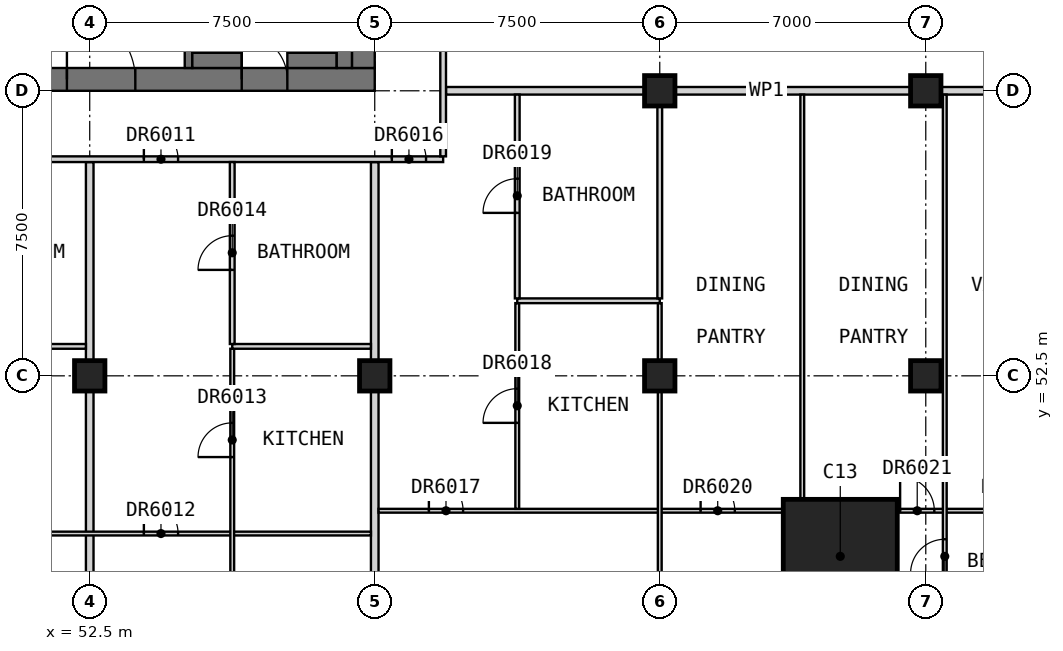
"""IFC4 building model, lengths in metres.
Left out: names, types, materials, properties, quantities, classifications, styles, units other than length and angle.
Written with IfcOpenShell. Run it as: python <this file> out.ifc"""

import sys

from ifc_helpers import new_model, si_unit, direction, frame, frame_2d, origin, origin_2d, place, context, subcontext, project, spatial, rectangle, extrude, element, fill, save


model = new_model("IFC4")
c1 = context("Model", 3, precision=1e-05, world=origin(), true_north=direction((0.0, 1.0)))
c2 = subcontext(c1, "Body", "Model", "MODEL_VIEW")
j1 = project(units=[si_unit("LENGTHUNIT", "METRE"), si_unit("PLANEANGLEUNIT", "RADIAN")], contexts=[c1])
p1 = place(None, origin())
s1 = spatial("IfcSite", under=j1, at=p1, CompositionType="ELEMENT")
p2 = place(p1, origin())
s2 = spatial("IfcBuilding", under=s1, at=p2, CompositionType="ELEMENT")
p3 = place(p2, frame((0.0, 0.0, 254.7)))
s3 = spatial("IfcBuildingStorey", under=s2, at=p3, CompositionType="ELEMENT", Elevation=254.7)
for number, where, z_axis, x_axis in (
    (1, (52.5, 52.5, 0.0), (0.0, 0.0, 1.0), (1.0, 0.0, 0.0)),
    (2, (60.0, 52.5, 0.0), (0.0, 0.0, 1.0), (1.0, 0.0, 0.0)),
    (3, (67.5, 52.5, 0.0), (0.0, 0.0, 1.0), (1.0, 0.0, 0.0)),
    (4, (67.5, 60.0, 0.0), (0.0, 0.0, 1.0), (1.0, 0.0, 0.0)),
    (5, (74.5, 52.5, 0.0), (0.0, 0.0, 1.0), (1.0, 0.0, 0.0)),
    (6, (74.5, 60.0, 0.0), (0.0, 0.0, 1.0), (1.0, 0.0, 0.0)),
):
    element("IfcColumn", number, at=place(p3, frame(where, z_axis=z_axis, x_axis=x_axis)), inside=s3, PredefinedType="COLUMN", context=c2, shape_type="SweptSolid", body=[
        extrude(rectangle(XDim=0.8, YDim=0.8, at=origin_2d()), origin(), (0.0, 0.0, 1.0), 3.5),
    ])
p4 = place(p3, frame((72.25, 47.75, 0.0), z_axis=(0.0, 0.0, 1.0), x_axis=(1.0, 0.0, 0.0)))
e7 = element("IfcColumn", 7, at=p4, inside=s3, PredefinedType="COLUMN", context=c2, shape_type="SweptSolid", body=[
    extrude(rectangle(XDim=3.0, YDim=3.0, at=origin_2d()), origin(), (0.0, 0.0, 1.0), 3.5),
])
p5 = place(p3, frame((30.0, 60.3, 0.0), z_axis=(0.0, 0.0, 1.0), x_axis=(1.0, 0.0, 0.0)))
e8 = element("IfcWall", 8, at=p5, inside=s3, PredefinedType="SHEAR", context=c2, shape_type="SweptSolid", body=[
    extrude(rectangle(XDim=30.0, YDim=0.6, at=frame_2d((15.0, 0.0))), origin(), (0.0, 0.0, 1.0), 3.5),
])
p6 = place(p5, frame((21.9, 0.0, 0.0)))
e9 = element("IfcOpeningElement", 9, at=p6, cuts=e8, PredefinedType="OPENING", context=c2, shape_type="SweptSolid", body=[
    extrude(rectangle(XDim=1.8, YDim=2.1, at=frame_2d((0.9, 1.05))), frame((0.0, 0.31, 0.0), z_axis=(0.0, -1.0, 0.0), x_axis=(1.0, 0.0, 0.0)), (0.0, 0.0, 1.0), 0.62),
])
p7 = place(p5, frame((26.5, 0.0, 0.0)))
e10 = element("IfcOpeningElement", 10, at=p7, cuts=e8, PredefinedType="OPENING", context=c2, shape_type="SweptSolid", body=[
    extrude(rectangle(XDim=1.2, YDim=2.1, at=frame_2d((0.6, 1.05))), frame((0.0, 0.31, 0.0), z_axis=(0.0, -1.0, 0.0), x_axis=(1.0, 0.0, 0.0)), (0.0, 0.0, 1.0), 0.62),
])
p8 = place(p3, frame((59.7, 60.6, 0.0), z_axis=(0.0, 0.0, 1.0), x_axis=(0.0, 1.0, 0.0)))
e11 = element("IfcWall", 11, at=p8, inside=s3, PredefinedType="SHEAR", context=c2, shape_type="SweptSolid", body=[
    extrude(rectangle(XDim=21.3, YDim=0.6, at=frame_2d((10.65, 0.0))), origin(), (0.0, 0.0, 1.0), 3.5),
])
p9 = place(p8, frame((14.9, 0.0, 0.0)))
e12 = element("IfcOpeningElement", 12, at=p9, cuts=e11, PredefinedType="OPENING", context=c2, shape_type="SweptSolid", body=[
    extrude(rectangle(XDim=1.8, YDim=2.1, at=frame_2d((0.9, 1.05))), frame((0.0, 0.31, 0.0), z_axis=(0.0, -1.0, 0.0), x_axis=(1.0, 0.0, 0.0)), (0.0, 0.0, 1.0), 0.62),
])
p10 = place(p3, frame((55.1, 60.6, 0.0), z_axis=(0.0, 0.0, 1.0), x_axis=(0.0, 1.0, 0.0)))
e13 = element("IfcWall", 13, at=p10, inside=s3, PredefinedType="SOLIDWALL", context=c2, shape_type="SweptSolid", body=[
    extrude(rectangle(XDim=8.0, YDim=0.2, at=frame_2d((4.0, 0.0))), origin(), (0.0, 0.0, 1.0), 3.09),
])
for number, where, z_axis, x_axis in (
    (14, (55.2, 60.8, 0.0), (0.0, 0.0, 1.0), (1.0, 0.0, 0.0)),
    (15, (57.7, 60.8, 0.0), (0.0, 0.0, 1.0), (1.0, 0.0, 0.0)),
):
    element("IfcWall", number, at=place(p3, frame(where, z_axis=z_axis, x_axis=x_axis)), inside=s3, PredefinedType="SOLIDWALL", context=c2, shape_type="SweptSolid", body=[
        extrude(rectangle(XDim=1.3, YDim=0.4, at=frame_2d((0.65, 0.0))), origin(), (0.0, 0.0, 1.0), 3.09),
    ])
p11 = place(p3, frame((59.2, 60.6, 0.0), z_axis=(0.0, 0.0, 1.0), x_axis=(0.0, 1.0, 0.0)))
e16 = element("IfcWall", 16, at=p11, inside=s3, PredefinedType="SOLIDWALL", context=c2, shape_type="SweptSolid", body=[
    extrude(rectangle(XDim=7.9, YDim=0.4, at=frame_2d((3.95, 0.0))), origin(), (0.0, 0.0, 1.0), 3.09),
])
for number, where, z_axis, x_axis in (
    (17, (61.875, 60.0, 0.0), (0.0, 0.0, 1.0), (1.0, 0.0, 0.0)),
    (18, (52.5, 41.25, 0.0), (0.0, 0.0, 1.0), (0.0, 1.0, 0.0)),
    (19, (60.0, 41.25, 0.0), (0.0, 0.0, 1.0), (0.0, 1.0, 0.0)),
):
    element("IfcWall", number, at=place(p3, frame(where, z_axis=z_axis, x_axis=x_axis)), inside=s3, PredefinedType="PARTITIONING", context=c2, shape_type="SweptSolid", body=[
        extrude(rectangle(XDim=16.875, YDim=0.2, at=frame_2d((8.438, 0.0))), origin(), (0.0, 0.0, 1.0), 3.1),
    ])
p12 = place(p3, frame((33.75, 58.2, 0.0), z_axis=(0.0, 0.0, 1.0), x_axis=(1.0, 0.0, 0.0)))
e20 = element("IfcWall", 20, at=p12, inside=s3, PredefinedType="PARTITIONING", context=c2, shape_type="SweptSolid", body=[
    extrude(rectangle(XDim=28.05, YDim=0.15, at=frame_2d((14.025, 0.0))), origin(), (0.0, 0.0, 1.0), 3.1),
])
p13 = place(p12, frame((1.375, 0.0, 0.0)))
e21 = element("IfcOpeningElement", 21, at=p13, cuts=e20, PredefinedType="OPENING", context=c2, shape_type="SweptSolid", body=[
    extrude(rectangle(XDim=1.0, YDim=2.1, at=frame_2d((0.5, 1.05))), frame((0.0, 0.085, 0.0), z_axis=(0.0, -1.0, 0.0), x_axis=(1.0, 0.0, 0.0)), (0.0, 0.0, 1.0), 0.17),
])
p14 = place(p12, frame((5.175, 0.0, 0.0)))
e22 = element("IfcOpeningElement", 22, at=p14, cuts=e20, PredefinedType="OPENING", context=c2, shape_type="SweptSolid", body=[
    extrude(rectangle(XDim=0.9, YDim=2.1, at=frame_2d((0.45, 1.05))), frame((0.0, 0.085, 0.0), z_axis=(0.0, -1.0, 0.0), x_axis=(1.0, 0.0, 0.0)), (0.0, 0.0, 1.0), 0.17),
])
p15 = place(p12, frame((12.675, 0.0, 0.0)))
e23 = element("IfcOpeningElement", 23, at=p15, cuts=e20, PredefinedType="OPENING", context=c2, shape_type="SweptSolid", body=[
    extrude(rectangle(XDim=0.9, YDim=2.1, at=frame_2d((0.45, 1.05))), frame((0.0, 0.085, 0.0), z_axis=(0.0, -1.0, 0.0), x_axis=(1.0, 0.0, 0.0)), (0.0, 0.0, 1.0), 0.17),
])
p16 = place(p12, frame((20.175, 0.0, 0.0)))
e24 = element("IfcOpeningElement", 24, at=p16, cuts=e20, PredefinedType="OPENING", context=c2, shape_type="SweptSolid", body=[
    extrude(rectangle(XDim=0.9, YDim=2.1, at=frame_2d((0.45, 1.05))), frame((0.0, 0.085, 0.0), z_axis=(0.0, -1.0, 0.0), x_axis=(1.0, 0.0, 0.0)), (0.0, 0.0, 1.0), 0.17),
])
p17 = place(p12, frame((26.7, 0.0, 0.0)))
e25 = element("IfcOpeningElement", 25, at=p17, cuts=e20, PredefinedType="OPENING", context=c2, shape_type="SweptSolid", body=[
    extrude(rectangle(XDim=0.9, YDim=2.1, at=frame_2d((0.45, 1.05))), frame((0.0, 0.085, 0.0), z_axis=(0.0, -1.0, 0.0), x_axis=(1.0, 0.0, 0.0)), (0.0, 0.0, 1.0), 0.17),
])
p18 = place(p3, frame((61.8, 58.275, 0.0), z_axis=(0.0, 0.0, 1.0), x_axis=(0.0, 1.0, 0.0)))
e26 = element("IfcWall", 26, at=p18, inside=s3, PredefinedType="PARTITIONING", context=c2, shape_type="SweptSolid", body=[
    extrude(rectangle(XDim=25.95, YDim=0.15, at=frame_2d((12.975, 0.0))), origin(), (0.0, 0.0, 1.0), 3.1),
])
p19 = place(p18, frame((4.575, 0.0, 0.0)))
e27 = element("IfcOpeningElement", 27, at=p19, cuts=e26, PredefinedType="OPENING", context=c2, shape_type="SweptSolid", body=[
    extrude(rectangle(XDim=1.8, YDim=2.1, at=frame_2d((0.9, 1.05))), frame((0.0, 0.085, 0.0), z_axis=(0.0, -1.0, 0.0), x_axis=(1.0, 0.0, 0.0)), (0.0, 0.0, 1.0), 0.17),
])
p20 = place(p18, frame((10.65, 0.0, 0.0)))
e28 = element("IfcOpeningElement", 28, at=p20, cuts=e26, PredefinedType="OPENING", context=c2, shape_type="SweptSolid", body=[
    extrude(rectangle(XDim=0.9, YDim=2.1, at=frame_2d((0.45, 1.05))), frame((0.0, 0.085, 0.0), z_axis=(0.0, -1.0, 0.0), x_axis=(1.0, 0.0, 0.0)), (0.0, 0.0, 1.0), 0.17),
])
p21 = place(p18, frame((18.15, 0.0, 0.0)))
e29 = element("IfcOpeningElement", 29, at=p21, cuts=e26, PredefinedType="OPENING", context=c2, shape_type="SweptSolid", body=[
    extrude(rectangle(XDim=0.9, YDim=2.1, at=frame_2d((0.45, 1.05))), frame((0.0, 0.085, 0.0), z_axis=(0.0, -1.0, 0.0), x_axis=(1.0, 0.0, 0.0)), (0.0, 0.0, 1.0), 0.17),
])
p22 = place(p3, frame((37.6, 48.35, 0.0), z_axis=(0.0, 0.0, 1.0), x_axis=(1.0, 0.0, 0.0)))
e30 = element("IfcWall", 30, at=p22, inside=s3, PredefinedType="PARTITIONING", context=c2, shape_type="SweptSolid", body=[
    extrude(rectangle(XDim=22.3, YDim=0.1, at=frame_2d((11.15, 0.0))), origin(), (0.0, 0.0, 1.0), 3.1),
])
p23 = place(p22, frame((1.325, 0.0, 0.0)))
e31 = element("IfcOpeningElement", 31, at=p23, cuts=e30, PredefinedType="OPENING", context=c2, shape_type="SweptSolid", body=[
    extrude(rectangle(XDim=0.9, YDim=2.1, at=frame_2d((0.45, 1.05))), frame((0.0, 0.06, 0.0), z_axis=(0.0, -1.0, 0.0), x_axis=(1.0, 0.0, 0.0)), (0.0, 0.0, 1.0), 0.12),
])
p24 = place(p22, frame((8.825, 0.0, 0.0)))
e32 = element("IfcOpeningElement", 32, at=p24, cuts=e30, PredefinedType="OPENING", context=c2, shape_type="SweptSolid", body=[
    extrude(rectangle(XDim=0.9, YDim=2.1, at=frame_2d((0.45, 1.05))), frame((0.0, 0.06, 0.0), z_axis=(0.0, -1.0, 0.0), x_axis=(1.0, 0.0, 0.0)), (0.0, 0.0, 1.0), 0.12),
])
p25 = place(p22, frame((16.325, 0.0, 0.0)))
e33 = element("IfcOpeningElement", 33, at=p25, cuts=e30, PredefinedType="OPENING", context=c2, shape_type="SweptSolid", body=[
    extrude(rectangle(XDim=0.9, YDim=2.1, at=frame_2d((0.45, 1.05))), frame((0.0, 0.06, 0.0), z_axis=(0.0, -1.0, 0.0), x_axis=(1.0, 0.0, 0.0)), (0.0, 0.0, 1.0), 0.12),
])
p26 = place(p3, frame((60.1, 48.95, 0.0), z_axis=(0.0, 0.0, 1.0), x_axis=(1.0, 0.0, 0.0)))
e34 = element("IfcWall", 34, at=p26, inside=s3, PredefinedType="PARTITIONING", context=c2, shape_type="SweptSolid", body=[
    extrude(rectangle(XDim=17.84, YDim=0.1, at=frame_2d((8.92, 0.0))), origin(), (0.0, 0.0, 1.0), 3.1),
])
p27 = place(p26, frame((1.325, 0.0, 0.0)))
e35 = element("IfcOpeningElement", 35, at=p27, cuts=e34, PredefinedType="OPENING", context=c2, shape_type="SweptSolid", body=[
    extrude(rectangle(XDim=0.9, YDim=2.1, at=frame_2d((0.45, 1.05))), frame((0.0, 0.06, 0.0), z_axis=(0.0, -1.0, 0.0), x_axis=(1.0, 0.0, 0.0)), (0.0, 0.0, 1.0), 0.12),
])
p28 = place(p26, frame((8.475, 0.0, 0.0)))
e36 = element("IfcOpeningElement", 36, at=p28, cuts=e34, PredefinedType="OPENING", context=c2, shape_type="SweptSolid", body=[
    extrude(rectangle(XDim=0.9, YDim=2.1, at=frame_2d((0.45, 1.05))), frame((0.0, 0.06, 0.0), z_axis=(0.0, -1.0, 0.0), x_axis=(1.0, 0.0, 0.0)), (0.0, 0.0, 1.0), 0.12),
])
p29 = place(p26, frame((13.725, 0.0, 0.0)))
e37 = element("IfcOpeningElement", 37, at=p29, cuts=e34, PredefinedType="OPENING", context=c2, shape_type="SweptSolid", body=[
    extrude(rectangle(XDim=0.9, YDim=2.1, at=frame_2d((0.45, 1.05))), frame((0.0, 0.06, 0.0), z_axis=(0.0, -1.0, 0.0), x_axis=(1.0, 0.0, 0.0)), (0.0, 0.0, 1.0), 0.12),
])
p30 = place(p26, frame((16.325, 0.0, 0.0)))
e38 = element("IfcOpeningElement", 38, at=p30, cuts=e34, PredefinedType="OPENING", context=c2, shape_type="SweptSolid", body=[
    extrude(rectangle(XDim=0.9, YDim=2.1, at=frame_2d((0.45, 1.05))), frame((0.0, 0.06, 0.0), z_axis=(0.0, -1.0, 0.0), x_axis=(1.0, 0.0, 0.0)), (0.0, 0.0, 1.0), 0.12),
])
p31 = place(p3, frame((56.25, 42.06, 0.0), z_axis=(0.0, 0.0, 1.0), x_axis=(0.0, 1.0, 0.0)))
e39 = element("IfcWall", 39, at=p31, inside=s3, PredefinedType="PARTITIONING", context=c2, shape_type="SweptSolid", body=[
    extrude(rectangle(XDim=11.152, YDim=0.1, at=frame_2d((5.576, 0.0))), origin(), (0.0, 0.0, 1.0), 3.1),
])
p32 = place(p31, frame((8.302, 0.0, 0.0)))
e40 = element("IfcOpeningElement", 40, at=p32, cuts=e39, PredefinedType="OPENING", context=c2, shape_type="SweptSolid", body=[
    extrude(rectangle(XDim=0.9, YDim=2.1, at=frame_2d((0.45, 1.05))), frame((0.0, 0.06, 0.0), z_axis=(0.0, -1.0, 0.0), x_axis=(1.0, 0.0, 0.0)), (0.0, 0.0, 1.0), 0.12),
])
p33 = place(p31, frame((2.29, 0.0, 0.0)))
e41 = element("IfcOpeningElement", 41, at=p33, cuts=e39, PredefinedType="OPENING", context=c2, shape_type="SweptSolid", body=[
    extrude(rectangle(XDim=0.9, YDim=2.1, at=frame_2d((0.45, 1.05))), frame((0.0, 0.06, 0.0), z_axis=(0.0, -1.0, 0.0), x_axis=(1.0, 0.0, 0.0)), (0.0, 0.0, 1.0), 0.12),
])
p34 = place(p3, frame((63.75, 49.0, 0.0), z_axis=(0.0, 0.0, 1.0), x_axis=(0.0, 1.0, 0.0)))
e42 = element("IfcWall", 42, at=p34, inside=s3, PredefinedType="PARTITIONING", context=c2, shape_type="SweptSolid", body=[
    extrude(rectangle(XDim=5.413, YDim=0.1, at=frame_2d((2.706, 0.0))), origin(), (0.0, 0.0, 1.0), 3.1),
])
p35 = place(p34, frame((2.262, 0.0, 0.0)))
e43 = element("IfcOpeningElement", 43, at=p35, cuts=e42, PredefinedType="OPENING", context=c2, shape_type="SweptSolid", body=[
    extrude(rectangle(XDim=0.9, YDim=2.1, at=frame_2d((0.45, 1.05))), frame((0.0, 0.06, 0.0), z_axis=(0.0, -1.0, 0.0), x_axis=(1.0, 0.0, 0.0)), (0.0, 0.0, 1.0), 0.12),
])
p36 = place(p3, frame((67.5, 41.25, 0.0), z_axis=(0.0, 0.0, 1.0), x_axis=(0.0, 1.0, 0.0)))
e44 = element("IfcWall", 44, at=p36, inside=s3, PredefinedType="PARTITIONING", context=c2, shape_type="SweptSolid", body=[
    extrude(rectangle(XDim=13.163, YDim=0.1, at=frame_2d((6.581, 0.0))), origin(), (0.0, 0.0, 1.0), 3.1),
])
p37 = place(p36, frame((2.9, 0.0, 0.0)))
e45 = element("IfcOpeningElement", 45, at=p37, cuts=e44, PredefinedType="OPENING", context=c2, shape_type="SweptSolid", body=[
    extrude(rectangle(XDim=0.9, YDim=2.1, at=frame_2d((0.45, 1.05))), frame((0.0, 0.06, 0.0), z_axis=(0.0, -1.0, 0.0), x_axis=(1.0, 0.0, 0.0)), (0.0, 0.0, 1.0), 0.12),
])
p38 = place(p3, frame((71.25, 49.0, 0.0), z_axis=(0.0, 0.0, 1.0), x_axis=(0.0, 1.0, 0.0)))
e46 = element("IfcWall", 46, at=p38, inside=s3, PredefinedType="PARTITIONING", context=c2, shape_type="SweptSolid", body=[
    extrude(rectangle(XDim=10.9, YDim=0.1, at=frame_2d((5.45, 0.0))), origin(), (0.0, 0.0, 1.0), 3.1),
])
p39 = place(p3, frame((75.0, 47.06, 0.0), z_axis=(0.0, 0.0, 1.0), x_axis=(0.0, 1.0, 0.0)))
e47 = element("IfcWall", 47, at=p39, inside=s3, PredefinedType="PARTITIONING", context=c2, shape_type="SweptSolid", body=[
    extrude(rectangle(XDim=12.84, YDim=0.1, at=frame_2d((6.42, 0.0))), origin(), (0.0, 0.0, 1.0), 3.1),
])
p40 = place(p39, frame((0.24, 0.0, 0.0)))
e48 = element("IfcOpeningElement", 48, at=p40, cuts=e47, PredefinedType="OPENING", context=c2, shape_type="SweptSolid", body=[
    extrude(rectangle(XDim=0.9, YDim=2.1, at=frame_2d((0.45, 1.05))), frame((0.0, 0.06, 0.0), z_axis=(0.0, -1.0, 0.0), x_axis=(1.0, 0.0, 0.0)), (0.0, 0.0, 1.0), 0.12),
])
for number, where, z_axis, x_axis in (
    (49, (48.75, 53.275, 0.0), (0.0, 0.0, 1.0), (1.0, 0.0, 0.0)),
    (50, (56.25, 53.275, 0.0), (0.0, 0.0, 1.0), (1.0, 0.0, 0.0)),
):
    element("IfcWall", number, at=place(p3, frame(where, z_axis=z_axis, x_axis=x_axis)), inside=s3, PredefinedType="PARTITIONING", context=c2, shape_type="SweptSolid", body=[
        extrude(rectangle(XDim=3.65, YDim=0.125, at=frame_2d((1.825, 0.0))), origin(), (0.0, 0.0, 1.0), 3.1),
    ])
p41 = place(p3, frame((63.75, 54.475, 0.0), z_axis=(0.0, 0.0, 1.0), x_axis=(1.0, 0.0, 0.0)))
e51 = element("IfcWall", 51, at=p41, inside=s3, PredefinedType="PARTITIONING", context=c2, shape_type="SweptSolid", body=[
    extrude(rectangle(XDim=3.75, YDim=0.125, at=frame_2d((1.875, 0.0))), origin(), (0.0, 0.0, 1.0), 3.1),
])
p42 = place(p3, frame((56.25, 53.337, 0.0), z_axis=(0.0, 0.0, 1.0), x_axis=(0.0, 1.0, 0.0)))
e52 = element("IfcWall", 52, at=p42, inside=s3, PredefinedType="PARTITIONING", context=c2, shape_type="SweptSolid", body=[
    extrude(rectangle(XDim=4.788, YDim=0.125, at=frame_2d((2.394, 0.0))), origin(), (0.0, 0.0, 1.0), 3.1),
])
p43 = place(p42, frame((1.95, 0.0, 0.0)))
e53 = element("IfcOpeningElement", 53, at=p43, cuts=e52, PredefinedType="OPENING", context=c2, shape_type="SweptSolid", body=[
    extrude(rectangle(XDim=0.9, YDim=2.1, at=frame_2d((0.45, 1.05))), frame((0.0, 0.073, 0.0), z_axis=(0.0, -1.0, 0.0), x_axis=(1.0, 0.0, 0.0)), (0.0, 0.0, 1.0), 0.145),
])
p44 = place(p3, frame((63.75, 54.538, 0.0), z_axis=(0.0, 0.0, 1.0), x_axis=(0.0, 1.0, 0.0)))
e54 = element("IfcWall", 54, at=p44, inside=s3, PredefinedType="PARTITIONING", context=c2, shape_type="SweptSolid", body=[
    extrude(rectangle(XDim=5.362, YDim=0.125, at=frame_2d((2.681, 0.0))), origin(), (0.0, 0.0, 1.0), 3.1),
])
p45 = place(p44, frame((2.25, 0.0, 0.0)))
e55 = element("IfcOpeningElement", 55, at=p45, cuts=e54, PredefinedType="OPENING", context=c2, shape_type="SweptSolid", body=[
    extrude(rectangle(XDim=0.9, YDim=2.1, at=frame_2d((0.45, 1.05))), frame((0.0, 0.073, 0.0), z_axis=(0.0, -1.0, 0.0), x_axis=(1.0, 0.0, 0.0)), (0.0, 0.0, 1.0), 0.145),
])
p46 = place(p3, frame((67.5, 54.538, 0.0), z_axis=(0.0, 0.0, 1.0), x_axis=(0.0, 1.0, 0.0)))
e56 = element("IfcWall", 56, at=p46, inside=s3, PredefinedType="PARTITIONING", context=c2, shape_type="SweptSolid", body=[
    extrude(rectangle(XDim=5.362, YDim=0.125, at=frame_2d((2.681, 0.0))), origin(), (0.0, 0.0, 1.0), 3.1),
])
p47 = place(p6, origin())
e57 = element("IfcDoor", 57, at=p47, inside=s3, OperationType="DOUBLE_DOOR_SINGLE_SWING", PredefinedType="DOOR", context=c2, shape_type="SweptSolid", body=[
    extrude(rectangle(XDim=1.8, YDim=2.1, at=frame_2d((0.9, 1.05))), frame((0.0, 0.025, 0.0), z_axis=(0.0, -1.0, 0.0), x_axis=(1.0, 0.0, 0.0)), (0.0, 0.0, 1.0), 0.05),
])
fill(e9, e57)
p48 = place(p7, origin())
e58 = element("IfcDoor", 58, at=p48, inside=s3, OperationType="SINGLE_SWING_LEFT", PredefinedType="DOOR", context=c2, shape_type="SweptSolid", body=[
    extrude(rectangle(XDim=1.2, YDim=2.1, at=frame_2d((0.6, 1.05))), frame((0.0, 0.025, 0.0), z_axis=(0.0, -1.0, 0.0), x_axis=(1.0, 0.0, 0.0)), (0.0, 0.0, 1.0), 0.05),
])
fill(e10, e58)
p49 = place(p16, origin())
e59 = element("IfcDoor", 59, at=p49, inside=s3, OperationType="SINGLE_SWING_RIGHT", PredefinedType="DOOR", context=c2, shape_type="SweptSolid", body=[
    extrude(rectangle(XDim=0.9, YDim=2.1, at=frame_2d((0.45, 1.05))), frame((0.0, 0.025, 0.0), z_axis=(0.0, -1.0, 0.0), x_axis=(1.0, 0.0, 0.0)), (0.0, 0.0, 1.0), 0.05),
])
fill(e24, e59)
p50 = place(p25, origin())
e60 = element("IfcDoor", 60, at=p50, inside=s3, OperationType="SINGLE_SWING_LEFT", PredefinedType="DOOR", context=c2, shape_type="SweptSolid", body=[
    extrude(rectangle(XDim=0.9, YDim=2.1, at=frame_2d((0.45, 1.05))), frame((0.0, 0.025, 0.0), z_axis=(0.0, -1.0, 0.0), x_axis=(1.0, 0.0, 0.0)), (0.0, 0.0, 1.0), 0.05),
])
fill(e33, e60)
p51 = place(p32, origin())
e61 = element("IfcDoor", 61, at=p51, inside=s3, OperationType="SINGLE_SWING_LEFT", PredefinedType="DOOR", context=c2, shape_type="SweptSolid", body=[
    extrude(rectangle(XDim=0.9, YDim=2.1, at=frame_2d((0.45, 1.05))), frame((0.0, 0.025, 0.0), z_axis=(0.0, -1.0, 0.0), x_axis=(1.0, 0.0, 0.0)), (0.0, 0.0, 1.0), 0.05),
])
fill(e40, e61)
p52 = place(p43, origin())
e62 = element("IfcDoor", 62, at=p52, inside=s3, OperationType="SINGLE_SWING_RIGHT", PredefinedType="DOOR", context=c2, shape_type="SweptSolid", body=[
    extrude(rectangle(XDim=0.9, YDim=2.1, at=frame_2d((0.45, 1.05))), frame((0.0, 0.025, 0.0), z_axis=(0.0, -1.0, 0.0), x_axis=(1.0, 0.0, 0.0)), (0.0, 0.0, 1.0), 0.05),
])
fill(e53, e62)
p53 = place(p17, origin())
e63 = element("IfcDoor", 63, at=p53, inside=s3, OperationType="SINGLE_SWING_RIGHT", PredefinedType="DOOR", context=c2, shape_type="SweptSolid", body=[
    extrude(rectangle(XDim=0.9, YDim=2.1, at=frame_2d((0.45, 1.05))), frame((0.0, 0.025, 0.0), z_axis=(0.0, -1.0, 0.0), x_axis=(1.0, 0.0, 0.0)), (0.0, 0.0, 1.0), 0.05),
])
fill(e25, e63)
p54 = place(p27, origin())
e64 = element("IfcDoor", 64, at=p54, inside=s3, OperationType="SINGLE_SWING_LEFT", PredefinedType="DOOR", context=c2, shape_type="SweptSolid", body=[
    extrude(rectangle(XDim=0.9, YDim=2.1, at=frame_2d((0.45, 1.05))), frame((0.0, 0.025, 0.0), z_axis=(0.0, -1.0, 0.0), x_axis=(1.0, 0.0, 0.0)), (0.0, 0.0, 1.0), 0.05),
])
fill(e35, e64)
p55 = place(p35, origin())
e65 = element("IfcDoor", 65, at=p55, inside=s3, OperationType="SINGLE_SWING_RIGHT", PredefinedType="DOOR", context=c2, shape_type="SweptSolid", body=[
    extrude(rectangle(XDim=0.9, YDim=2.1, at=frame_2d((0.45, 1.05))), frame((0.0, 0.025, 0.0), z_axis=(0.0, -1.0, 0.0), x_axis=(1.0, 0.0, 0.0)), (0.0, 0.0, 1.0), 0.05),
])
fill(e43, e65)
p56 = place(p45, origin())
e66 = element("IfcDoor", 66, at=p56, inside=s3, OperationType="SINGLE_SWING_RIGHT", PredefinedType="DOOR", context=c2, shape_type="SweptSolid", body=[
    extrude(rectangle(XDim=0.9, YDim=2.1, at=frame_2d((0.45, 1.05))), frame((0.0, 0.025, 0.0), z_axis=(0.0, -1.0, 0.0), x_axis=(1.0, 0.0, 0.0)), (0.0, 0.0, 1.0), 0.05),
])
fill(e55, e66)
p57 = place(p28, origin())
e67 = element("IfcDoor", 67, at=p57, inside=s3, OperationType="SINGLE_SWING_LEFT", PredefinedType="DOOR", context=c2, shape_type="SweptSolid", body=[
    extrude(rectangle(XDim=0.9, YDim=2.1, at=frame_2d((0.45, 1.05))), frame((0.0, 0.025, 0.0), z_axis=(0.0, -1.0, 0.0), x_axis=(1.0, 0.0, 0.0)), (0.0, 0.0, 1.0), 0.05),
])
fill(e36, e67)
p58 = place(p29, origin())
e68 = element("IfcDoor", 68, at=p58, inside=s3, OperationType="SINGLE_SWING_RIGHT", PredefinedType="DOOR", context=c2, shape_type="SweptSolid", body=[
    extrude(rectangle(XDim=0.9, YDim=2.1, at=frame_2d((0.45, 1.05))), frame((0.0, 0.025, 0.0), z_axis=(0.0, -1.0, 0.0), x_axis=(1.0, 0.0, 0.0)), (0.0, 0.0, 1.0), 0.05),
])
fill(e37, e68)
p59 = place(p40, origin())
e69 = element("IfcDoor", 69, at=p59, inside=s3, OperationType="SINGLE_SWING_RIGHT", PredefinedType="DOOR", context=c2, shape_type="SweptSolid", body=[
    extrude(rectangle(XDim=0.9, YDim=2.1, at=frame_2d((0.45, 1.05))), frame((0.0, 0.025, 0.0), z_axis=(0.0, -1.0, 0.0), x_axis=(1.0, 0.0, 0.0)), (0.0, 0.0, 1.0), 0.05),
])
fill(e48, e69)
save(model, sys.argv[1])
